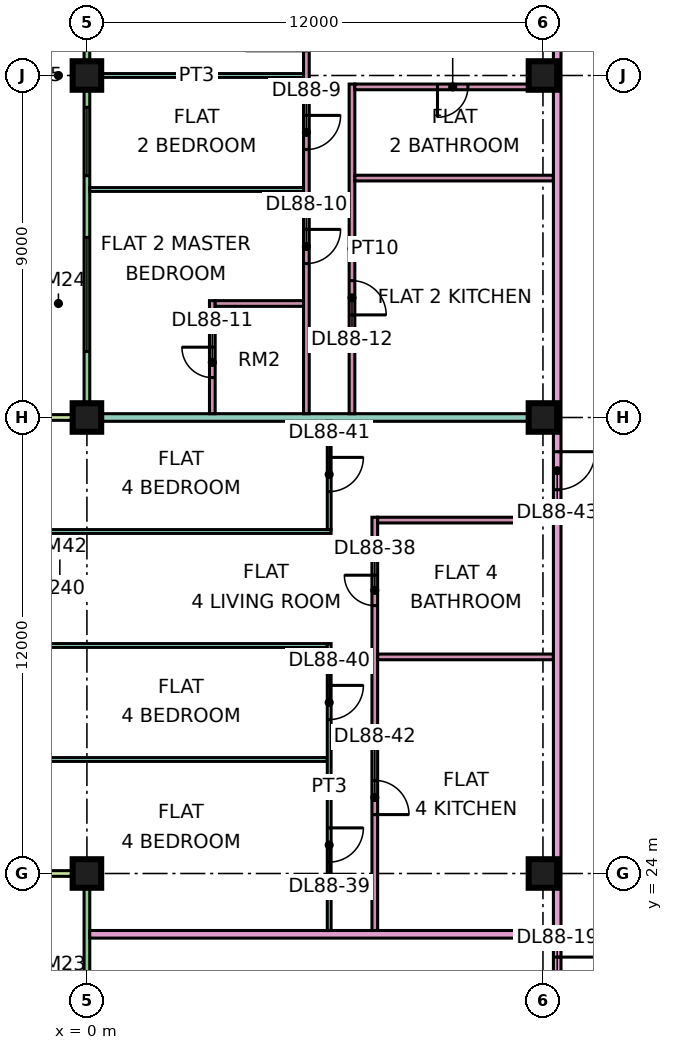
"""IFC4 building model, lengths in metres.
Left out: names, types, materials, properties, quantities, classifications, styles, units other than length and angle.
Written with IfcOpenShell. Run it as: python <this file> out.ifc"""

import sys

from ifc_helpers import new_model, si_unit, direction, frame, frame_2d, origin, origin_2d, place, context, subcontext, project, spatial, rectangle, extrude, element, fill, save


model = new_model("IFC4")
c1 = context("Model", 3, precision=1e-05, world=origin(), true_north=direction((0.0, 1.0)))
c2 = subcontext(c1, "Body", "Model", "MODEL_VIEW")
j1 = project(units=[si_unit("LENGTHUNIT", "METRE"), si_unit("PLANEANGLEUNIT", "RADIAN")], contexts=[c1])
p1 = place(None, origin())
s1 = spatial("IfcSite", under=j1, at=p1, CompositionType="ELEMENT")
p2 = place(p1, origin())
s2 = spatial("IfcBuilding", under=s1, at=p2, CompositionType="ELEMENT")
p3 = place(p2, frame((0.0, 0.0, 376.4)))
s3 = spatial("IfcBuildingStorey", under=s2, at=p3, CompositionType="ELEMENT", Elevation=376.4)
p4 = place(p3, frame((0.0, 24.0, 0.0), z_axis=(0.0, 0.0, 1.0), x_axis=(1.0, 0.0, 0.0)))
e1 = element("IfcColumn", 1, at=p4, inside=s3, PredefinedType="COLUMN", context=c2, shape_type="SweptSolid", body=[
    extrude(rectangle(XDim=0.75, YDim=0.75, at=origin_2d()), origin(), (0.0, 0.0, 1.0), 3.75),
])
p5 = place(p3, frame((0.0, 36.0, 0.0), z_axis=(0.0, 0.0, 1.0), x_axis=(1.0, 0.0, 0.0)))
e2 = element("IfcColumn", 2, at=p5, inside=s3, PredefinedType="COLUMN", context=c2, shape_type="SweptSolid", body=[
    extrude(rectangle(XDim=0.75, YDim=0.75, at=origin_2d()), origin(), (0.0, 0.0, 1.0), 3.75),
])
for number, where, z_axis, x_axis in (
    (3, (0.0, 45.0, 0.0), (0.0, 0.0, 1.0), (1.0, 0.0, 0.0)),
    (4, (12.0, 24.0, 0.0), (0.0, 0.0, 1.0), (1.0, 0.0, 0.0)),
    (5, (12.0, 36.0, 0.0), (0.0, 0.0, 1.0), (1.0, 0.0, 0.0)),
    (6, (12.0, 45.0, 0.0), (0.0, 0.0, 1.0), (1.0, 0.0, 0.0)),
):
    element("IfcColumn", number, at=place(p3, frame(where, z_axis=z_axis, x_axis=x_axis)), inside=s3, PredefinedType="COLUMN", context=c2, shape_type="SweptSolid", body=[
        extrude(rectangle(XDim=0.75, YDim=0.75, at=origin_2d()), origin(), (0.0, 0.0, 1.0), 3.75),
    ])
p6 = place(p3, frame((0.0, 47.925, 0.0), z_axis=(0.0, 0.0, 1.0), x_axis=(0.0, -1.0, 0.0)))
e7 = element("IfcWall", 7, at=p6, inside=s3, PredefinedType="SOLIDWALL", context=c2, shape_type="SweptSolid", body=[
    extrude(rectangle(XDim=11.85, YDim=0.15, at=frame_2d((5.925, 0.0))), origin(), (0.0, 0.0, 1.0), 3.35),
])
p7 = place(p6, frame((0.625, 0.0, 0.0)))
e8 = element("IfcOpeningElement", 8, at=p7, cuts=e7, PredefinedType="OPENING", context=c2, shape_type="SweptSolid", body=[
    extrude(rectangle(XDim=1.2, YDim=2.4, at=frame_2d((0.6, 1.2))), frame((0.0, 0.085, 0.0), z_axis=(0.0, -1.0, 0.0), x_axis=(1.0, 0.0, 0.0)), (0.0, 0.0, 1.0), 0.17),
])
p8 = place(p6, frame((3.762, 0.0, 0.45)))
e9 = element("IfcOpeningElement", 9, at=p8, cuts=e7, PredefinedType="OPENING", context=c2, shape_type="SweptSolid", body=[
    extrude(rectangle(XDim=1.8, YDim=2.4, at=frame_2d((0.9, 1.2))), frame((0.0, 0.085, 0.0), z_axis=(0.0, -1.0, 0.0), x_axis=(1.0, 0.0, 0.0)), (0.0, 0.0, 1.0), 0.17),
])
p9 = place(p6, frame((7.188, 0.0, 0.45)))
e10 = element("IfcOpeningElement", 10, at=p9, cuts=e7, PredefinedType="OPENING", context=c2, shape_type="SweptSolid", body=[
    extrude(rectangle(XDim=3.0, YDim=2.4, at=frame_2d((1.5, 1.2))), frame((0.0, 0.085, 0.0), z_axis=(0.0, -1.0, 0.0), x_axis=(1.0, 0.0, 0.0)), (0.0, 0.0, 1.0), 0.17),
])
p10 = place(p3, frame((-1.5, 36.0, 0.0), z_axis=(0.0, 0.0, 1.0), x_axis=(1.0, 0.0, 0.0)))
e11 = element("IfcWall", 11, at=p10, inside=s3, PredefinedType="SOLIDWALL", context=c2, shape_type="SweptSolid", body=[
    extrude(rectangle(XDim=1.5, YDim=0.15, at=frame_2d((0.75, 0.0))), origin(), (0.0, 0.0, 1.0), 3.35),
])
p11 = place(p3, frame((0.0, 23.925, 0.0), z_axis=(0.0, 0.0, 1.0), x_axis=(0.0, -1.0, 0.0)))
e12 = element("IfcWall", 12, at=p11, inside=s3, PredefinedType="SOLIDWALL", context=c2, shape_type="SweptSolid", body=[
    extrude(rectangle(XDim=11.35, YDim=0.15, at=frame_2d((5.675, 0.0))), origin(), (0.0, 0.0, 1.0), 3.35),
])
p12 = place(p11, frame((6.738, 0.0, 0.0)))
e13 = element("IfcOpeningElement", 13, at=p12, cuts=e12, PredefinedType="OPENING", context=c2, shape_type="SweptSolid", body=[
    extrude(rectangle(XDim=1.8, YDim=2.4, at=frame_2d((0.9, 1.2))), frame((0.0, 0.085, 0.0), z_axis=(0.0, -1.0, 0.0), x_axis=(1.0, 0.0, 0.0)), (0.0, 0.0, 1.0), 0.17),
])
p13 = place(p3, frame((-1.5, 24.0, 0.0), z_axis=(0.0, 0.0, 1.0), x_axis=(1.0, 0.0, 0.0)))
e14 = element("IfcWall", 14, at=p13, inside=s3, PredefinedType="SOLIDWALL", context=c2, shape_type="SweptSolid", body=[
    extrude(rectangle(XDim=1.5, YDim=0.15, at=frame_2d((0.75, 0.0))), origin(), (0.0, 0.0, 1.0), 3.35),
])
p14 = place(p3, frame((-1.351, 27.0, 0.0), z_axis=(0.0, 0.0, 1.0), x_axis=(1.0, 0.0, 0.0)))
e15 = element("IfcWall", 15, at=p14, inside=s3, PredefinedType="PARTITIONING", context=c2, shape_type="SweptSolid", body=[
    extrude(rectangle(XDim=7.676, YDim=0.1, at=frame_2d((3.838, 0.0))), origin(), (0.0, 0.0, 1.0), 3.35),
])
p15 = place(p3, frame((-1.35, 30.0, 0.0), z_axis=(0.0, 0.0, 1.0), x_axis=(1.0, 0.0, 0.0)))
e16 = element("IfcWall", 16, at=p15, inside=s3, PredefinedType="PARTITIONING", context=c2, shape_type="SweptSolid", body=[
    extrude(rectangle(XDim=7.675, YDim=0.1, at=frame_2d((3.837, 0.0))), origin(), (0.0, 0.0, 1.0), 3.35),
])
p16 = place(p3, frame((-1.35, 33.0, 0.0), z_axis=(0.0, 0.0, 1.0), x_axis=(1.0, 0.0, 0.0)))
e17 = element("IfcWall", 17, at=p16, inside=s3, PredefinedType="PARTITIONING", context=c2, shape_type="SweptSolid", body=[
    extrude(rectangle(XDim=7.775, YDim=0.1, at=frame_2d((3.888, 0.0))), origin(), (0.0, 0.0, 1.0), 3.35),
])
e18 = element("IfcWall", 18, at=p5, inside=s3, PredefinedType="PARTITIONING", context=c2, shape_type="SweptSolid", body=[
    extrude(rectangle(XDim=12.275, YDim=0.2, at=frame_2d((6.137, 0.0))), origin(), (0.0, 0.0, 1.0), 3.35),
])
p17 = place(p3, frame((0.074, 22.4, 0.0), z_axis=(0.0, 0.0, 1.0), x_axis=(1.0, 0.0, 0.0)))
e19 = element("IfcWall", 19, at=p17, inside=s3, PredefinedType="PARTITIONING", context=c2, shape_type="SweptSolid", body=[
    extrude(rectangle(XDim=12.201, YDim=0.2, at=frame_2d((6.101, 0.0))), origin(), (0.0, 0.0, 1.0), 3.35),
])
for number, where, z_axis, x_axis in (
    (20, (0.074, 42.0, 0.0), (0.0, 0.0, 1.0), (1.0, 0.0, 0.0)),
    (21, (0.074, 45.0, 0.0), (0.0, 0.0, 1.0), (1.0, 0.0, 0.0)),
):
    element("IfcWall", number, at=place(p3, frame(where, z_axis=z_axis, x_axis=x_axis)), inside=s3, PredefinedType="PARTITIONING", context=c2, shape_type="SweptSolid", body=[
        extrude(rectangle(XDim=5.626, YDim=0.1, at=frame_2d((2.813, 0.0))), origin(), (0.0, 0.0, 1.0), 3.35),
    ])
p18 = place(p3, frame((3.3, 36.1, 0.0), z_axis=(0.0, 0.0, 1.0), x_axis=(0.0, 1.0, 0.0)))
e22 = element("IfcWall", 22, at=p18, inside=s3, PredefinedType="PARTITIONING", context=c2, shape_type="SweptSolid", body=[
    extrude(rectangle(XDim=2.975, YDim=0.15, at=frame_2d((1.487, 0.0))), origin(), (0.0, 0.0, 1.0), 3.35),
])
p19 = place(p18, frame((0.95, 0.0, 0.0)))
e23 = element("IfcOpeningElement", 23, at=p19, cuts=e22, PredefinedType="OPENING", context=c2, shape_type="SweptSolid", body=[
    extrude(rectangle(XDim=0.8, YDim=2.1, at=frame_2d((0.4, 1.05))), frame((0.0, 0.085, 0.0), z_axis=(0.0, -1.0, 0.0), x_axis=(1.0, 0.0, 0.0)), (0.0, 0.0, 1.0), 0.17),
])
p20 = place(p3, frame((3.375, 39.0, 0.0), z_axis=(0.0, 0.0, 1.0), x_axis=(1.0, 0.0, 0.0)))
e24 = element("IfcWall", 24, at=p20, inside=s3, PredefinedType="PARTITIONING", context=c2, shape_type="SweptSolid", body=[
    extrude(rectangle(XDim=2.325, YDim=0.15, at=frame_2d((1.163, 0.0))), origin(), (0.0, 0.0, 1.0), 3.35),
])
p21 = place(p3, frame((5.775, 36.1, 0.0), z_axis=(0.0, 0.0, 1.0), x_axis=(0.0, 1.0, 0.0)))
e25 = element("IfcWall", 25, at=p21, inside=s3, PredefinedType="PARTITIONING", context=c2, shape_type="SweptSolid", body=[
    extrude(rectangle(XDim=14.95, YDim=0.15, at=frame_2d((7.475, 0.0))), origin(), (0.0, 0.0, 1.0), 3.35),
])
p22 = place(p21, frame((6.95, 0.0, 0.0)))
e26 = element("IfcOpeningElement", 26, at=p22, cuts=e25, PredefinedType="OPENING", context=c2, shape_type="SweptSolid", body=[
    extrude(rectangle(XDim=0.9, YDim=2.1, at=frame_2d((0.45, 1.05))), frame((0.0, 0.085, 0.0), z_axis=(0.0, -1.0, 0.0), x_axis=(1.0, 0.0, 0.0)), (0.0, 0.0, 1.0), 0.17),
])
p23 = place(p21, frame((3.95, 0.0, 0.0)))
e27 = element("IfcOpeningElement", 27, at=p23, cuts=e25, PredefinedType="OPENING", context=c2, shape_type="SweptSolid", body=[
    extrude(rectangle(XDim=0.9, YDim=2.1, at=frame_2d((0.45, 1.05))), frame((0.0, 0.085, 0.0), z_axis=(0.0, -1.0, 0.0), x_axis=(1.0, 0.0, 0.0)), (0.0, 0.0, 1.0), 0.17),
])
p24 = place(p21, frame((13.8, 0.0, 0.0)))
e28 = element("IfcOpeningElement", 28, at=p24, cuts=e25, PredefinedType="OPENING", context=c2, shape_type="SweptSolid", body=[
    extrude(rectangle(XDim=0.8, YDim=2.1, at=frame_2d((0.4, 1.05))), frame((0.0, 0.085, 0.0), z_axis=(0.0, -1.0, 0.0), x_axis=(1.0, 0.0, 0.0)), (0.0, 0.0, 1.0), 0.17),
])
p25 = place(p21, frame((9.55, 0.0, 0.0)))
e29 = element("IfcOpeningElement", 29, at=p25, cuts=e25, PredefinedType="OPENING", context=c2, shape_type="SweptSolid", body=[
    extrude(rectangle(XDim=1.6, YDim=2.1, at=frame_2d((0.8, 1.05))), frame((0.0, 0.085, 0.0), z_axis=(0.0, -1.0, 0.0), x_axis=(1.0, 0.0, 0.0)), (0.0, 0.0, 1.0), 0.17),
])
p26 = place(p3, frame((6.375, 22.5, 0.0), z_axis=(0.0, 0.0, 1.0), x_axis=(0.0, 1.0, 0.0)))
e30 = element("IfcWall", 30, at=p26, inside=s3, PredefinedType="PARTITIONING", context=c2, shape_type="SweptSolid", body=[
    extrude(rectangle(XDim=7.55, YDim=0.1, at=frame_2d((3.775, 0.0))), origin(), (0.0, 0.0, 1.0), 3.35),
])
p27 = place(p26, frame((1.8, 0.0, 0.0)))
e31 = element("IfcOpeningElement", 31, at=p27, cuts=e30, PredefinedType="OPENING", context=c2, shape_type="SweptSolid", body=[
    extrude(rectangle(XDim=0.9, YDim=2.1, at=frame_2d((0.45, 1.05))), frame((0.0, 0.06, 0.0), z_axis=(0.0, -1.0, 0.0), x_axis=(1.0, 0.0, 0.0)), (0.0, 0.0, 1.0), 0.12),
])
p28 = place(p26, frame((5.55, 0.0, 0.0)))
e32 = element("IfcOpeningElement", 32, at=p28, cuts=e30, PredefinedType="OPENING", context=c2, shape_type="SweptSolid", body=[
    extrude(rectangle(XDim=0.9, YDim=2.1, at=frame_2d((0.45, 1.05))), frame((0.0, 0.06, 0.0), z_axis=(0.0, -1.0, 0.0), x_axis=(1.0, 0.0, 0.0)), (0.0, 0.0, 1.0), 0.12),
])
p29 = place(p3, frame((6.375, 33.05, 0.0), z_axis=(0.0, 0.0, 1.0), x_axis=(0.0, 1.0, 0.0)))
e33 = element("IfcWall", 33, at=p29, inside=s3, PredefinedType="PARTITIONING", context=c2, shape_type="SweptSolid", body=[
    extrude(rectangle(XDim=2.85, YDim=0.1, at=frame_2d((1.425, 0.0))), origin(), (0.0, 0.0, 1.0), 3.35),
])
p30 = place(p29, frame((1.0, 0.0, 0.0)))
e34 = element("IfcOpeningElement", 34, at=p30, cuts=e33, PredefinedType="OPENING", context=c2, shape_type="SweptSolid", body=[
    extrude(rectangle(XDim=0.9, YDim=2.1, at=frame_2d((0.45, 1.05))), frame((0.0, 0.06, 0.0), z_axis=(0.0, -1.0, 0.0), x_axis=(1.0, 0.0, 0.0)), (0.0, 0.0, 1.0), 0.12),
])
p31 = place(p3, frame((6.975, 36.1, 0.0), z_axis=(0.0, 0.0, 1.0), x_axis=(0.0, 1.0, 0.0)))
e35 = element("IfcWall", 35, at=p31, inside=s3, PredefinedType="PARTITIONING", context=c2, shape_type="SweptSolid", body=[
    extrude(rectangle(XDim=8.675, YDim=0.15, at=frame_2d((4.337, 0.0))), origin(), (0.0, 0.0, 1.0), 3.35),
])
p32 = place(p31, frame((2.6, 0.0, 0.0)))
e36 = element("IfcOpeningElement", 36, at=p32, cuts=e35, PredefinedType="OPENING", context=c2, shape_type="SweptSolid", body=[
    extrude(rectangle(XDim=0.9, YDim=2.1, at=frame_2d((0.45, 1.05))), frame((0.0, 0.085, 0.0), z_axis=(0.0, -1.0, 0.0), x_axis=(1.0, 0.0, 0.0)), (0.0, 0.0, 1.0), 0.17),
])
p33 = place(p3, frame((7.05, 42.3, 0.0), z_axis=(0.0, 0.0, 1.0), x_axis=(1.0, 0.0, 0.0)))
e37 = element("IfcWall", 37, at=p33, inside=s3, PredefinedType="PARTITIONING", context=c2, shape_type="SweptSolid", body=[
    extrude(rectangle(XDim=5.225, YDim=0.15, at=frame_2d((2.612, 0.0))), origin(), (0.0, 0.0, 1.0), 3.35),
])
p34 = place(p3, frame((7.05, 44.7, 0.0), z_axis=(0.0, 0.0, 1.0), x_axis=(1.0, 0.0, 0.0)))
e38 = element("IfcWall", 38, at=p34, inside=s3, PredefinedType="PARTITIONING", context=c2, shape_type="SweptSolid", body=[
    extrude(rectangle(XDim=5.225, YDim=0.15, at=frame_2d((2.612, 0.0))), origin(), (0.0, 0.0, 1.0), 3.35),
])
p35 = place(p34, frame((2.175, 0.0, 0.0)))
e39 = element("IfcOpeningElement", 39, at=p35, cuts=e38, PredefinedType="OPENING", context=c2, shape_type="SweptSolid", body=[
    extrude(rectangle(XDim=0.8, YDim=2.1, at=frame_2d((0.4, 1.05))), frame((0.0, 0.085, 0.0), z_axis=(0.0, -1.0, 0.0), x_axis=(1.0, 0.0, 0.0)), (0.0, 0.0, 1.0), 0.17),
])
p36 = place(p3, frame((7.575, 22.5, 0.0), z_axis=(0.0, 0.0, 1.0), x_axis=(0.0, 1.0, 0.0)))
e40 = element("IfcWall", 40, at=p36, inside=s3, PredefinedType="PARTITIONING", context=c2, shape_type="SweptSolid", body=[
    extrude(rectangle(XDim=10.875, YDim=0.15, at=frame_2d((5.438, 0.0))), origin(), (0.0, 0.0, 1.0), 3.35),
])
p37 = place(p36, frame((8.55, 0.0, 0.0)))
e41 = element("IfcOpeningElement", 41, at=p37, cuts=e40, PredefinedType="OPENING", context=c2, shape_type="SweptSolid", body=[
    extrude(rectangle(XDim=0.8, YDim=2.1, at=frame_2d((0.4, 1.05))), frame((0.0, 0.085, 0.0), z_axis=(0.0, -1.0, 0.0), x_axis=(1.0, 0.0, 0.0)), (0.0, 0.0, 1.0), 0.17),
])
p38 = place(p36, frame((3.05, 0.0, 0.0)))
e42 = element("IfcOpeningElement", 42, at=p38, cuts=e40, PredefinedType="OPENING", context=c2, shape_type="SweptSolid", body=[
    extrude(rectangle(XDim=0.9, YDim=2.1, at=frame_2d((0.45, 1.05))), frame((0.0, 0.085, 0.0), z_axis=(0.0, -1.0, 0.0), x_axis=(1.0, 0.0, 0.0)), (0.0, 0.0, 1.0), 0.17),
])
for number, where, z_axis, x_axis in (
    (43, (7.65, 29.7, 0.0), (0.0, 0.0, 1.0), (1.0, 0.0, 0.0)),
    (44, (7.65, 33.3, 0.0), (0.0, 0.0, 1.0), (1.0, 0.0, 0.0)),
):
    element("IfcWall", number, at=place(p3, frame(where, z_axis=z_axis, x_axis=x_axis)), inside=s3, PredefinedType="PARTITIONING", context=c2, shape_type="SweptSolid", body=[
        extrude(rectangle(XDim=4.625, YDim=0.15, at=frame_2d((2.312, 0.0))), origin(), (0.0, 0.0, 1.0), 3.35),
    ])
p39 = place(p3, frame((12.375, 20.0, 0.0), z_axis=(0.0, 0.0, 1.0), x_axis=(0.0, 1.0, 0.0)))
e45 = element("IfcWall", 45, at=p39, inside=s3, PredefinedType="PARTITIONING", context=c2, shape_type="SweptSolid", body=[
    extrude(rectangle(XDim=33.926, YDim=0.2, at=frame_2d((16.963, 0.0))), origin(), (0.0, 0.0, 1.0), 3.35),
])
p40 = place(p39, frame((27.6, 0.0, 0.0)))
e46 = element("IfcOpeningElement", 46, at=p40, cuts=e45, PredefinedType="OPENING", context=c2, shape_type="SweptSolid", body=[
    extrude(rectangle(XDim=1.0, YDim=2.1, at=frame_2d((0.5, 1.05))), frame((0.0, 0.11, 0.0), z_axis=(0.0, -1.0, 0.0), x_axis=(1.0, 0.0, 0.0)), (0.0, 0.0, 1.0), 0.22),
])
p41 = place(p39, frame((0.6, 0.0, 0.0)))
e47 = element("IfcOpeningElement", 47, at=p41, cuts=e45, PredefinedType="OPENING", context=c2, shape_type="SweptSolid", body=[
    extrude(rectangle(XDim=1.2, YDim=2.1, at=frame_2d((0.6, 1.05))), frame((0.0, 0.11, 0.0), z_axis=(0.0, -1.0, 0.0), x_axis=(1.0, 0.0, 0.0)), (0.0, 0.0, 1.0), 0.22),
])
p42 = place(p39, frame((14.1, 0.0, 0.0)))
e48 = element("IfcOpeningElement", 48, at=p42, cuts=e45, PredefinedType="OPENING", context=c2, shape_type="SweptSolid", body=[
    extrude(rectangle(XDim=1.0, YDim=2.1, at=frame_2d((0.5, 1.05))), frame((0.0, 0.11, 0.0), z_axis=(0.0, -1.0, 0.0), x_axis=(1.0, 0.0, 0.0)), (0.0, 0.0, 1.0), 0.22),
])
p43 = place(p8, origin())
e49 = element("IfcWindow", 49, at=p43, inside=s3, PartitioningType="SINGLE_PANEL", PredefinedType="WINDOW", context=c2, shape_type="SweptSolid", body=[
    extrude(rectangle(XDim=1.8, YDim=2.4, at=frame_2d((0.9, 1.2))), frame((0.0, 0.03, 0.0), z_axis=(0.0, -1.0, 0.0), x_axis=(1.0, 0.0, 0.0)), (0.0, 0.0, 1.0), 0.06),
])
fill(e9, e49)
p44 = place(p9, origin())
e50 = element("IfcWindow", 50, at=p44, inside=s3, PartitioningType="SINGLE_PANEL", PredefinedType="WINDOW", context=c2, shape_type="SweptSolid", body=[
    extrude(rectangle(XDim=3.0, YDim=2.4, at=frame_2d((1.5, 1.2))), frame((0.0, 0.03, 0.0), z_axis=(0.0, -1.0, 0.0), x_axis=(1.0, 0.0, 0.0)), (0.0, 0.0, 1.0), 0.06),
])
fill(e10, e50)
p45 = place(p35, frame((0.8, 0.0, 0.0), z_axis=(0.0, 0.0, 1.0), x_axis=(-1.0, 0.0, 0.0)))
e51 = element("IfcDoor", 51, at=p45, inside=s3, OperationType="SINGLE_SWING_LEFT", PredefinedType="DOOR", context=c2, shape_type="SweptSolid", body=[
    extrude(rectangle(XDim=0.8, YDim=2.1, at=frame_2d((0.4, 1.05))), frame((0.0, 0.025, 0.0), z_axis=(0.0, -1.0, 0.0), x_axis=(1.0, 0.0, 0.0)), (0.0, 0.0, 1.0), 0.05),
])
fill(e39, e51)
p46 = place(p22, origin())
e52 = element("IfcDoor", 52, at=p46, inside=s3, OperationType="SINGLE_SWING_RIGHT", PredefinedType="DOOR", context=c2, shape_type="SweptSolid", body=[
    extrude(rectangle(XDim=0.9, YDim=2.1, at=frame_2d((0.45, 1.05))), frame((0.0, 0.025, 0.0), z_axis=(0.0, -1.0, 0.0), x_axis=(1.0, 0.0, 0.0)), (0.0, 0.0, 1.0), 0.05),
])
fill(e26, e52)
p47 = place(p23, origin())
e53 = element("IfcDoor", 53, at=p47, inside=s3, OperationType="SINGLE_SWING_RIGHT", PredefinedType="DOOR", context=c2, shape_type="SweptSolid", body=[
    extrude(rectangle(XDim=0.9, YDim=2.1, at=frame_2d((0.45, 1.05))), frame((0.0, 0.025, 0.0), z_axis=(0.0, -1.0, 0.0), x_axis=(1.0, 0.0, 0.0)), (0.0, 0.0, 1.0), 0.05),
])
fill(e27, e53)
p48 = place(p19, frame((0.8, 0.0, 0.0), z_axis=(0.0, 0.0, 1.0), x_axis=(-1.0, 0.0, 0.0)))
e54 = element("IfcDoor", 54, at=p48, inside=s3, OperationType="SINGLE_SWING_RIGHT", PredefinedType="DOOR", context=c2, shape_type="SweptSolid", body=[
    extrude(rectangle(XDim=0.8, YDim=2.1, at=frame_2d((0.4, 1.05))), frame((0.0, 0.025, 0.0), z_axis=(0.0, -1.0, 0.0), x_axis=(1.0, 0.0, 0.0)), (0.0, 0.0, 1.0), 0.05),
])
fill(e23, e54)
p49 = place(p32, frame((0.9, 0.0, 0.0), z_axis=(0.0, 0.0, 1.0), x_axis=(-1.0, 0.0, 0.0)))
e55 = element("IfcDoor", 55, at=p49, inside=s3, OperationType="SINGLE_SWING_LEFT", PredefinedType="DOOR", context=c2, shape_type="SweptSolid", body=[
    extrude(rectangle(XDim=0.9, YDim=2.1, at=frame_2d((0.45, 1.05))), frame((0.0, 0.025, 0.0), z_axis=(0.0, -1.0, 0.0), x_axis=(1.0, 0.0, 0.0)), (0.0, 0.0, 1.0), 0.05),
])
fill(e36, e55)
p50 = place(p41, origin())
e56 = element("IfcDoor", 56, at=p50, inside=s3, OperationType="SINGLE_SWING_RIGHT", PredefinedType="DOOR", context=c2, shape_type="SweptSolid", body=[
    extrude(rectangle(XDim=1.2, YDim=2.1, at=frame_2d((0.6, 1.05))), frame((0.0, 0.025, 0.0), z_axis=(0.0, -1.0, 0.0), x_axis=(1.0, 0.0, 0.0)), (0.0, 0.0, 1.0), 0.05),
])
fill(e47, e56)
p51 = place(p37, frame((0.8, 0.0, 0.0), z_axis=(0.0, 0.0, 1.0), x_axis=(-1.0, 0.0, 0.0)))
e57 = element("IfcDoor", 57, at=p51, inside=s3, OperationType="SINGLE_SWING_RIGHT", PredefinedType="DOOR", context=c2, shape_type="SweptSolid", body=[
    extrude(rectangle(XDim=0.8, YDim=2.1, at=frame_2d((0.4, 1.05))), frame((0.0, 0.025, 0.0), z_axis=(0.0, -1.0, 0.0), x_axis=(1.0, 0.0, 0.0)), (0.0, 0.0, 1.0), 0.05),
])
fill(e41, e57)
p52 = place(p27, origin())
e58 = element("IfcDoor", 58, at=p52, inside=s3, OperationType="SINGLE_SWING_RIGHT", PredefinedType="DOOR", context=c2, shape_type="SweptSolid", body=[
    extrude(rectangle(XDim=0.9, YDim=2.1, at=frame_2d((0.45, 1.05))), frame((0.0, 0.025, 0.0), z_axis=(0.0, -1.0, 0.0), x_axis=(1.0, 0.0, 0.0)), (0.0, 0.0, 1.0), 0.05),
])
fill(e31, e58)
p53 = place(p28, origin())
e59 = element("IfcDoor", 59, at=p53, inside=s3, OperationType="SINGLE_SWING_RIGHT", PredefinedType="DOOR", context=c2, shape_type="SweptSolid", body=[
    extrude(rectangle(XDim=0.9, YDim=2.1, at=frame_2d((0.45, 1.05))), frame((0.0, 0.025, 0.0), z_axis=(0.0, -1.0, 0.0), x_axis=(1.0, 0.0, 0.0)), (0.0, 0.0, 1.0), 0.05),
])
fill(e32, e59)
p54 = place(p30, origin())
e60 = element("IfcDoor", 60, at=p54, inside=s3, OperationType="SINGLE_SWING_RIGHT", PredefinedType="DOOR", context=c2, shape_type="SweptSolid", body=[
    extrude(rectangle(XDim=0.9, YDim=2.1, at=frame_2d((0.45, 1.05))), frame((0.0, 0.025, 0.0), z_axis=(0.0, -1.0, 0.0), x_axis=(1.0, 0.0, 0.0)), (0.0, 0.0, 1.0), 0.05),
])
fill(e34, e60)
p55 = place(p38, frame((0.9, 0.0, 0.0), z_axis=(0.0, 0.0, 1.0), x_axis=(-1.0, 0.0, 0.0)))
e61 = element("IfcDoor", 61, at=p55, inside=s3, OperationType="SINGLE_SWING_LEFT", PredefinedType="DOOR", context=c2, shape_type="SweptSolid", body=[
    extrude(rectangle(XDim=0.9, YDim=2.1, at=frame_2d((0.45, 1.05))), frame((0.0, 0.025, 0.0), z_axis=(0.0, -1.0, 0.0), x_axis=(1.0, 0.0, 0.0)), (0.0, 0.0, 1.0), 0.05),
])
fill(e42, e61)
p56 = place(p42, origin())
e62 = element("IfcDoor", 62, at=p56, inside=s3, OperationType="SINGLE_SWING_RIGHT", PredefinedType="DOOR", context=c2, shape_type="SweptSolid", body=[
    extrude(rectangle(XDim=1.0, YDim=2.1, at=frame_2d((0.5, 1.05))), frame((0.0, 0.025, 0.0), z_axis=(0.0, -1.0, 0.0), x_axis=(1.0, 0.0, 0.0)), (0.0, 0.0, 1.0), 0.05),
])
fill(e48, e62)
save(model, sys.argv[1])
